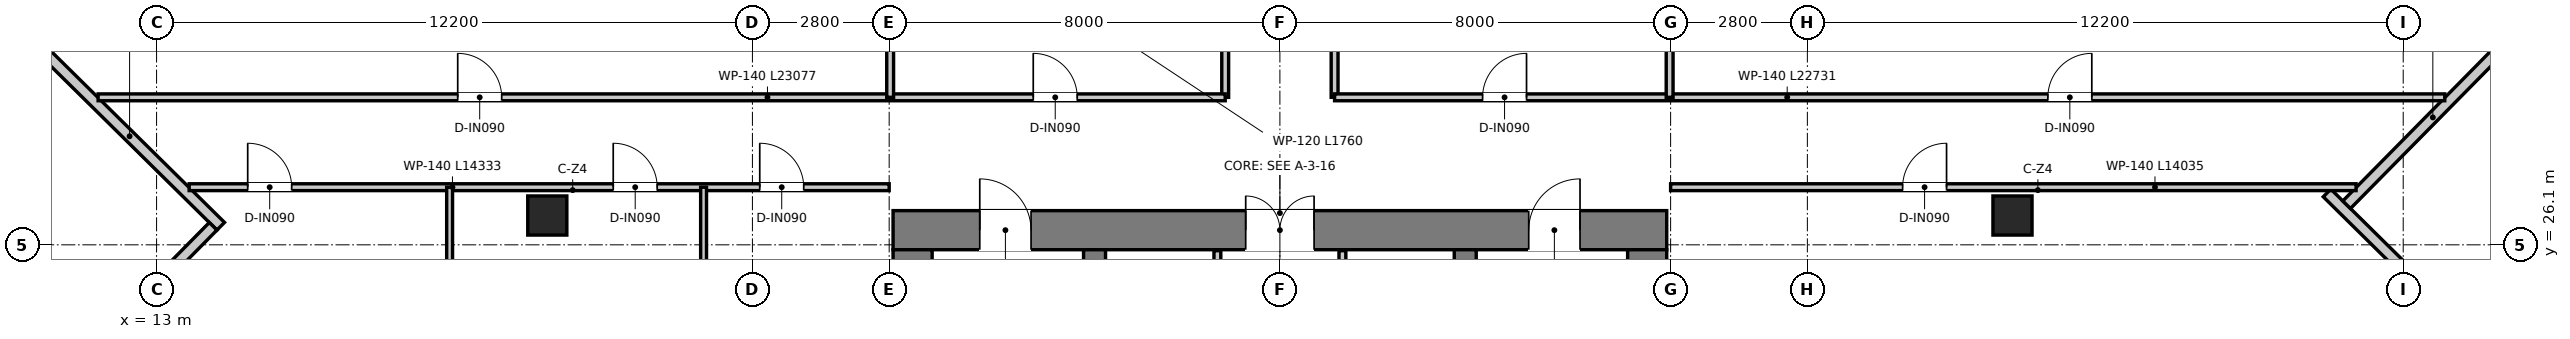
"""IFC4 building model, lengths in metres.
Left out: names, types, materials, properties, quantities, classifications, styles, units other than length and angle.
Written with IfcOpenShell. Run it as: python <this file> out.ifc"""

import sys

from ifc_helpers import new_model, si_unit, direction, frame, frame_2d, origin, origin_2d, place, context, subcontext, project, spatial, rectangle, extrude, source, transform, mapped, element, fill, save


model = new_model("IFC4")
c1 = context("Model", 3, precision=1e-05, world=origin(), true_north=direction((0.0, 1.0)))
c2 = subcontext(c1, "Body", "Model", "MODEL_VIEW")
j1 = project(units=[si_unit("LENGTHUNIT", "METRE"), si_unit("PLANEANGLEUNIT", "RADIAN")], contexts=[c1])
p1 = place(None, origin())
s1 = spatial("IfcSite", under=j1, at=p1, CompositionType="ELEMENT")
p2 = place(p1, origin())
s2 = spatial("IfcBuilding", under=s1, at=p2, CompositionType="ELEMENT")
p3 = place(p2, frame((0.0, 0.0, 234.95)))
s3 = spatial("IfcBuildingStorey", under=s2, at=p3, CompositionType="ELEMENT", Elevation=234.95)
p4 = place(p3, frame((28.08, 26.4, 0.0), z_axis=(0.0, 0.0, 1.0), x_axis=(1.0, 0.0, 0.0)))
e1 = element("IfcWall", 1, at=p4, inside=s3, PredefinedType="SHEAR", context=c2, shape_type="SweptSolid", body=[
    extrude(rectangle(XDim=15.84, YDim=0.8, at=frame_2d((7.92, 0.0))), origin(), (0.0, 0.0, 1.0), 3.95),
])
p5 = place(p4, frame((7.22, 0.0, 0.0)))
e2 = element("IfcOpeningElement", 2, at=p5, cuts=e1, PredefinedType="OPENING", context=c2, shape_type="SweptSolid", body=[
    extrude(rectangle(XDim=1.4, YDim=2.2, at=frame_2d((0.7, 1.1))), frame((0.0, 0.41, 0.0), z_axis=(0.0, -1.0, 0.0), x_axis=(1.0, 0.0, 0.0)), (0.0, 0.0, 1.0), 0.82),
])
p6 = place(p4, frame((1.775, 0.0, 0.0)))
e3 = element("IfcOpeningElement", 3, at=p6, cuts=e1, PredefinedType="OPENING", context=c2, shape_type="SweptSolid", body=[
    extrude(rectangle(XDim=1.05, YDim=2.1, at=frame_2d((0.525, 1.05))), frame((0.0, 0.41, 0.0), z_axis=(0.0, -1.0, 0.0), x_axis=(1.0, 0.0, 0.0)), (0.0, 0.0, 1.0), 0.82),
])
p7 = place(p4, frame((13.015, 0.0, 0.0)))
e4 = element("IfcOpeningElement", 4, at=p7, cuts=e1, PredefinedType="OPENING", context=c2, shape_type="SweptSolid", body=[
    extrude(rectangle(XDim=1.05, YDim=2.1, at=frame_2d((0.525, 1.05))), frame((0.0, 0.41, 0.0), z_axis=(0.0, -1.0, 0.0), x_axis=(1.0, 0.0, 0.0)), (0.0, 0.0, 1.0), 0.82),
])
for number, where, z_axis, x_axis in (
    (5, (28.48, 11.3, 0.0), (0.0, 0.0, 1.0), (0.0, 1.0, 0.0)),
    (6, (43.52, 11.3, 0.0), (0.0, 0.0, 1.0), (0.0, 1.0, 0.0)),
):
    element("IfcWall", number, at=place(p3, frame(where, z_axis=z_axis, x_axis=x_axis)), inside=s3, PredefinedType="SHEAR", context=c2, shape_type="SweptSolid", body=[
        extrude(rectangle(XDim=14.7, YDim=0.8, at=frame_2d((7.35, 0.0))), origin(), (0.0, 0.0, 1.0), 3.95),
    ])
p8 = place(p3, frame((32.205, 13.22, 0.0), z_axis=(0.0, 0.0, 1.0), x_axis=(0.0, 1.0, 0.0)))
e7 = element("IfcWall", 7, at=p8, inside=s3, PredefinedType="SHEAR", context=c2, shape_type="SweptSolid", body=[
    extrude(rectangle(XDim=12.78, YDim=0.45, at=frame_2d((6.39, 0.0))), origin(), (0.0, 0.0, 1.0), 3.95),
])
p9 = place(p8, frame((10.58, 0.0, 0.0)))
e8 = element("IfcOpeningElement", 8, at=p9, cuts=e7, PredefinedType="OPENING", context=c2, shape_type="SweptSolid", body=[
    extrude(rectangle(XDim=1.1, YDim=2.15, at=frame_2d((0.55, 1.075))), frame((0.0, 0.235, 0.0), z_axis=(0.0, -1.0, 0.0), x_axis=(1.0, 0.0, 0.0)), (0.0, 0.0, 1.0), 0.47),
])
p10 = place(p3, frame((39.795, 13.22, 0.0), z_axis=(0.0, 0.0, 1.0), x_axis=(0.0, 1.0, 0.0)))
e9 = element("IfcWall", 9, at=p10, inside=s3, PredefinedType="SHEAR", context=c2, shape_type="SweptSolid", body=[
    extrude(rectangle(XDim=12.78, YDim=0.45, at=frame_2d((6.39, 0.0))), origin(), (0.0, 0.0, 1.0), 3.95),
])
p11 = place(p10, frame((10.58, 0.0, 0.0)))
e10 = element("IfcOpeningElement", 10, at=p11, cuts=e9, PredefinedType="OPENING", context=c2, shape_type="SweptSolid", body=[
    extrude(rectangle(XDim=1.1, YDim=2.15, at=frame_2d((0.55, 1.075))), frame((0.0, 0.235, 0.0), z_axis=(0.0, -1.0, 0.0), x_axis=(1.0, 0.0, 0.0)), (0.0, 0.0, 1.0), 0.47),
])
m1 = source(origin(), c2, "Body", "SweptSolid", [
    extrude(rectangle(XDim=0.8, YDim=0.8, at=origin_2d()), origin(), (0.0, 0.0, 1.0), 3.95),
])
for number, where, z_axis, x_axis in (
    (11, (21.0, 26.7, 0.0), (0.0, 0.0, 1.0), (1.0, 0.0, 0.0)),
    (12, (51.0, 26.7, 0.0), (0.0, 0.0, 1.0), (1.0, 0.0, 0.0)),
):
    element("IfcColumn", number, at=place(p3, frame(where, z_axis=z_axis, x_axis=x_axis)), inside=s3, PredefinedType="COLUMN", context=c2, shape_type="MappedRepresentation", body=[
        mapped(m1, transform((0.0, 0.0, 0.0), x_axis=(1.0, 0.0, 0.0), y_axis=(0.0, 1.0, 0.0), z_axis=(0.0, 0.0, 1.0), scale=1.0)),
    ])
p12 = place(p3, frame((10.581, 30.165, 0.0), z_axis=(0.0, 0.0, 1.0), x_axis=(0.711699894533, -0.702483636906, 0.0)))
e13 = element("IfcWall", 13, at=p12, inside=s3, PredefinedType="ELEMENTEDWALL", context=c2, shape_type="SweptSolid", body=[
    extrude(rectangle(XDim=5.245, YDim=0.22, at=frame_2d((2.623, 0.0))), origin(), (0.0, 0.0, 1.0), 3.67),
])
p13 = place(p3, frame((14.158, 26.479, 0.0), z_axis=(0.0, 0.0, 1.0), x_axis=(-0.702451626199, -0.711731489292, 0.0)))
e14 = element("IfcWall", 14, at=p13, inside=s3, PredefinedType="ELEMENTEDWALL", context=c2, shape_type="SweptSolid", body=[
    extrude(rectangle(XDim=5.025, YDim=0.22, at=frame_2d((2.512, 0.0))), origin(), (0.0, 0.0, 1.0), 3.67),
])
p14 = place(p3, frame((61.419, 23.235, 0.0), z_axis=(0.0, 0.0, 1.0), x_axis=(-0.711721132709, 0.702462119446, 0.0)))
e15 = element("IfcWall", 15, at=p14, inside=s3, PredefinedType="ELEMENTEDWALL", context=c2, shape_type="SweptSolid", body=[
    extrude(rectangle(XDim=5.59, YDim=0.22, at=frame_2d((2.795, 0.0))), origin(), (0.0, 0.0, 1.0), 3.67),
])
p15 = place(p3, frame((57.842, 26.921, 0.0), z_axis=(0.0, 0.0, 1.0), x_axis=(0.702451626199, 0.711731489292, 0.0)))
e16 = element("IfcWall", 16, at=p15, inside=s3, PredefinedType="ELEMENTEDWALL", context=c2, shape_type="SweptSolid", body=[
    extrude(rectangle(XDim=5.025, YDim=0.22, at=frame_2d((2.512, 0.0))), origin(), (0.0, 0.0, 1.0), 3.67),
])
p16 = place(p3, frame((34.72, 20.2, 0.0), z_axis=(0.0, 0.0, 1.0), x_axis=(0.0, 1.0, 0.0)))
e17 = element("IfcWall", 17, at=p16, inside=s3, PredefinedType="PARTITIONING", context=c2, shape_type="SweptSolid", body=[
    extrude(rectangle(XDim=5.78, YDim=0.14, at=frame_2d((2.89, 0.0))), origin(), (0.0, 0.0, 1.0), 2.67),
])
p17 = place(p16, frame((1.05, 0.0, 0.0)))
e18 = element("IfcOpeningElement", 18, at=p17, cuts=e17, PredefinedType="OPENING", context=c2, shape_type="SweptSolid", body=[
    extrude(rectangle(XDim=0.9, YDim=2.1, at=frame_2d((0.45, 1.05))), frame((0.0, 0.08, 0.0), z_axis=(0.0, -1.0, 0.0), x_axis=(1.0, 0.0, 0.0)), (0.0, 0.0, 1.0), 0.16),
])
p18 = place(p3, frame((37.28, 20.2, 0.0), z_axis=(0.0, 0.0, 1.0), x_axis=(0.0, 1.0, 0.0)))
e19 = element("IfcWall", 19, at=p18, inside=s3, PredefinedType="PARTITIONING", context=c2, shape_type="SweptSolid", body=[
    extrude(rectangle(XDim=5.78, YDim=0.14, at=frame_2d((2.89, 0.0))), origin(), (0.0, 0.0, 1.0), 2.67),
])
p19 = place(p18, frame((0.95, 0.0, 0.0)))
e20 = element("IfcOpeningElement", 20, at=p19, cuts=e19, PredefinedType="OPENING", context=c2, shape_type="SweptSolid", body=[
    extrude(rectangle(XDim=1.1, YDim=2.15, at=frame_2d((0.55, 1.075))), frame((0.0, 0.08, 0.0), z_axis=(0.0, -1.0, 0.0), x_axis=(1.0, 0.0, 0.0)), (0.0, 0.0, 1.0), 0.16),
])
p20 = place(p3, frame((34.88, 29.12, 0.0), z_axis=(0.0, 0.0, 1.0), x_axis=(0.0, 1.0, 0.0)))
e21 = element("IfcWall", 21, at=p20, inside=s3, PredefinedType="PARTITIONING", context=c2, shape_type="SweptSolid", body=[
    extrude(rectangle(XDim=11.76, YDim=0.14, at=frame_2d((5.88, 0.0))), origin(), (0.0, 0.0, 1.0), 3.03),
])
p21 = place(p20, frame((4.085, 0.0, 0.0)))
e22 = element("IfcOpeningElement", 22, at=p21, cuts=e21, PredefinedType="OPENING", context=c2, shape_type="SweptSolid", body=[
    extrude(rectangle(XDim=0.95, YDim=2.1, at=frame_2d((0.475, 1.05))), frame((0.0, 0.08, 0.0), z_axis=(0.0, -1.0, 0.0), x_axis=(1.0, 0.0, 0.0)), (0.0, 0.0, 1.0), 0.16),
])
p22 = place(p20, frame((6.82, 0.0, 0.0)))
e23 = element("IfcOpeningElement", 23, at=p22, cuts=e21, PredefinedType="OPENING", context=c2, shape_type="SweptSolid", body=[
    extrude(rectangle(XDim=0.9, YDim=2.1, at=frame_2d((0.45, 1.05))), frame((0.0, 0.08, 0.0), z_axis=(0.0, -1.0, 0.0), x_axis=(1.0, 0.0, 0.0)), (0.0, 0.0, 1.0), 0.16),
])
p23 = place(p20, frame((9.83, 0.0, 0.0)))
e24 = element("IfcOpeningElement", 24, at=p23, cuts=e21, PredefinedType="OPENING", context=c2, shape_type="SweptSolid", body=[
    extrude(rectangle(XDim=0.9, YDim=2.1, at=frame_2d((0.45, 1.05))), frame((0.0, 0.08, 0.0), z_axis=(0.0, -1.0, 0.0), x_axis=(1.0, 0.0, 0.0)), (0.0, 0.0, 1.0), 0.16),
])
p24 = place(p3, frame((37.12, 29.12, 0.0), z_axis=(0.0, 0.0, 1.0), x_axis=(0.0, 1.0, 0.0)))
e25 = element("IfcWall", 25, at=p24, inside=s3, PredefinedType="PARTITIONING", context=c2, shape_type="SweptSolid", body=[
    extrude(rectangle(XDim=11.76, YDim=0.14, at=frame_2d((5.88, 0.0))), origin(), (0.0, 0.0, 1.0), 3.03),
])
p25 = place(p24, frame((3.205, 0.0, 0.0)))
e26 = element("IfcOpeningElement", 26, at=p25, cuts=e25, PredefinedType="OPENING", context=c2, shape_type="SweptSolid", body=[
    extrude(rectangle(XDim=0.95, YDim=2.1, at=frame_2d((0.475, 1.05))), frame((0.0, 0.08, 0.0), z_axis=(0.0, -1.0, 0.0), x_axis=(1.0, 0.0, 0.0)), (0.0, 0.0, 1.0), 0.16),
])
p26 = place(p24, frame((8.02, 0.0, 0.0)))
e27 = element("IfcOpeningElement", 27, at=p26, cuts=e25, PredefinedType="OPENING", context=c2, shape_type="SweptSolid", body=[
    extrude(rectangle(XDim=0.9, YDim=2.1, at=frame_2d((0.45, 1.05))), frame((0.0, 0.08, 0.0), z_axis=(0.0, -1.0, 0.0), x_axis=(1.0, 0.0, 0.0)), (0.0, 0.0, 1.0), 0.16),
])
p27 = place(p3, frame((11.803, 29.12, 0.0), z_axis=(0.0, 0.0, 1.0), x_axis=(1.0, 0.0, 0.0)))
e28 = element("IfcWall", 28, at=p27, inside=s3, PredefinedType="PARTITIONING", context=c2, shape_type="SweptSolid", body=[
    extrude(rectangle(XDim=23.077, YDim=0.14, at=frame_2d((11.538, 0.0))), origin(), (0.0, 0.0, 1.0), 3.03),
])
p28 = place(p27, frame((19.147, 0.0, 0.0)))
e29 = element("IfcOpeningElement", 29, at=p28, cuts=e28, PredefinedType="OPENING", context=c2, shape_type="SweptSolid", body=[
    extrude(rectangle(XDim=0.9, YDim=2.1, at=frame_2d((0.45, 1.05))), frame((0.0, 0.08, 0.0), z_axis=(0.0, -1.0, 0.0), x_axis=(1.0, 0.0, 0.0)), (0.0, 0.0, 1.0), 0.16),
])
p29 = place(p27, frame((7.363, 0.0, 0.0)))
e30 = element("IfcOpeningElement", 30, at=p29, cuts=e28, PredefinedType="OPENING", context=c2, shape_type="SweptSolid", body=[
    extrude(rectangle(XDim=0.9, YDim=2.1, at=frame_2d((0.45, 1.05))), frame((0.0, 0.08, 0.0), z_axis=(0.0, -1.0, 0.0), x_axis=(1.0, 0.0, 0.0)), (0.0, 0.0, 1.0), 0.16),
])
p30 = place(p3, frame((37.12, 29.12, 0.0), z_axis=(0.0, 0.0, 1.0), x_axis=(1.0, 0.0, 0.0)))
e31 = element("IfcWall", 31, at=p30, inside=s3, PredefinedType="PARTITIONING", context=c2, shape_type="SweptSolid", body=[
    extrude(rectangle(XDim=22.73, YDim=0.14, at=frame_2d((11.365, 0.0))), origin(), (0.0, 0.0, 1.0), 3.03),
])
p31 = place(p30, frame((3.03, 0.0, 0.0)))
e32 = element("IfcOpeningElement", 32, at=p31, cuts=e31, PredefinedType="OPENING", context=c2, shape_type="SweptSolid", body=[
    extrude(rectangle(XDim=0.9, YDim=2.1, at=frame_2d((0.45, 1.05))), frame((0.0, 0.08, 0.0), z_axis=(0.0, -1.0, 0.0), x_axis=(1.0, 0.0, 0.0)), (0.0, 0.0, 1.0), 0.16),
])
p32 = place(p30, frame((14.604, 0.0, 0.0)))
e33 = element("IfcOpeningElement", 33, at=p32, cuts=e31, PredefinedType="OPENING", context=c2, shape_type="SweptSolid", body=[
    extrude(rectangle(XDim=0.9, YDim=2.1, at=frame_2d((0.45, 1.05))), frame((0.0, 0.08, 0.0), z_axis=(0.0, -1.0, 0.0), x_axis=(1.0, 0.0, 0.0)), (0.0, 0.0, 1.0), 0.16),
])
p33 = place(p3, frame((13.667, 27.28, 0.0), z_axis=(0.0, 0.0, 1.0), x_axis=(1.0, 0.0, 0.0)))
e34 = element("IfcWall", 34, at=p33, inside=s3, PredefinedType="PARTITIONING", context=c2, shape_type="SweptSolid", body=[
    extrude(rectangle(XDim=14.333, YDim=0.14, at=frame_2d((7.166, 0.0))), origin(), (0.0, 0.0, 1.0), 3.03),
])
p34 = place(p33, frame((1.198, 0.0, 0.0)))
e35 = element("IfcOpeningElement", 35, at=p34, cuts=e34, PredefinedType="OPENING", context=c2, shape_type="SweptSolid", body=[
    extrude(rectangle(XDim=0.9, YDim=2.1, at=frame_2d((0.45, 1.05))), frame((0.0, 0.08, 0.0), z_axis=(0.0, -1.0, 0.0), x_axis=(1.0, 0.0, 0.0)), (0.0, 0.0, 1.0), 0.16),
])
p35 = place(p33, frame((8.683, 0.0, 0.0)))
e36 = element("IfcOpeningElement", 36, at=p35, cuts=e34, PredefinedType="OPENING", context=c2, shape_type="SweptSolid", body=[
    extrude(rectangle(XDim=0.9, YDim=2.1, at=frame_2d((0.45, 1.05))), frame((0.0, 0.08, 0.0), z_axis=(0.0, -1.0, 0.0), x_axis=(1.0, 0.0, 0.0)), (0.0, 0.0, 1.0), 0.16),
])
p36 = place(p33, frame((11.683, 0.0, 0.0)))
e37 = element("IfcOpeningElement", 37, at=p36, cuts=e34, PredefinedType="OPENING", context=c2, shape_type="SweptSolid", body=[
    extrude(rectangle(XDim=0.9, YDim=2.1, at=frame_2d((0.45, 1.05))), frame((0.0, 0.08, 0.0), z_axis=(0.0, -1.0, 0.0), x_axis=(1.0, 0.0, 0.0)), (0.0, 0.0, 1.0), 0.16),
])
p37 = place(p3, frame((44.0, 27.28, 0.0), z_axis=(0.0, 0.0, 1.0), x_axis=(1.0, 0.0, 0.0)))
e38 = element("IfcWall", 38, at=p37, inside=s3, PredefinedType="PARTITIONING", context=c2, shape_type="SweptSolid", body=[
    extrude(rectangle(XDim=14.035, YDim=0.14, at=frame_2d((7.017, 0.0))), origin(), (0.0, 0.0, 1.0), 3.03),
])
p38 = place(p37, frame((4.75, 0.0, 0.0)))
e39 = element("IfcOpeningElement", 39, at=p38, cuts=e38, PredefinedType="OPENING", context=c2, shape_type="SweptSolid", body=[
    extrude(rectangle(XDim=0.9, YDim=2.1, at=frame_2d((0.45, 1.05))), frame((0.0, 0.08, 0.0), z_axis=(0.0, -1.0, 0.0), x_axis=(1.0, 0.0, 0.0)), (0.0, 0.0, 1.0), 0.16),
])
for number, where, z_axis, x_axis in (
    (40, (28.02, 29.12, 0.0), (0.0, 0.0, 1.0), (0.0, 1.0, 0.0)),
    (41, (43.98, 29.12, 0.0), (0.0, 0.0, 1.0), (0.0, 1.0, 0.0)),
):
    element("IfcWall", number, at=place(p3, frame(where, z_axis=z_axis, x_axis=x_axis)), inside=s3, PredefinedType="PARTITIONING", context=c2, shape_type="SweptSolid", body=[
        extrude(rectangle(XDim=5.46, YDim=0.14, at=frame_2d((2.73, 0.0))), origin(), (0.0, 0.0, 1.0), 3.37),
    ])
p39 = place(p3, frame((19.0, 14.802, 0.0), z_axis=(0.0, 0.0, 1.0), x_axis=(0.0, 1.0, 0.0)))
e42 = element("IfcWall", 42, at=p39, inside=s3, PredefinedType="PARTITIONING", context=c2, shape_type="SweptSolid", body=[
    extrude(rectangle(XDim=12.478, YDim=0.12, at=frame_2d((6.239, 0.0))), origin(), (0.0, 0.0, 1.0), 3.67),
])
p40 = place(p3, frame((24.2, 9.669, 0.0), z_axis=(0.0, 0.0, 1.0), x_axis=(0.0, 1.0, 0.0)))
e43 = element("IfcWall", 43, at=p40, inside=s3, PredefinedType="PARTITIONING", context=c2, shape_type="SweptSolid", body=[
    extrude(rectangle(XDim=17.611, YDim=0.12, at=frame_2d((8.805, 0.0))), origin(), (0.0, 0.0, 1.0), 3.18),
])
p41 = place(p5, origin())
e44 = element("IfcDoor", 44, at=p41, inside=s3, OperationType="DOUBLE_DOOR_SINGLE_SWING", PredefinedType="DOOR", context=c2, shape_type="SweptSolid", body=[
    extrude(rectangle(XDim=1.4, YDim=2.2, at=frame_2d((0.7, 1.1))), frame((0.0, 0.025, 0.0), z_axis=(0.0, -1.0, 0.0), x_axis=(1.0, 0.0, 0.0)), (0.0, 0.0, 1.0), 0.05),
])
fill(e2, e44)
p42 = place(p6, origin())
e45 = element("IfcDoor", 45, at=p42, inside=s3, OperationType="SINGLE_SWING_LEFT", PredefinedType="DOOR", context=c2, shape_type="SweptSolid", body=[
    extrude(rectangle(XDim=1.05, YDim=2.1, at=frame_2d((0.525, 1.05))), frame((0.0, 0.025, 0.0), z_axis=(0.0, -1.0, 0.0), x_axis=(1.0, 0.0, 0.0)), (0.0, 0.0, 1.0), 0.05),
])
fill(e3, e45)
p43 = place(p7, origin())
e46 = element("IfcDoor", 46, at=p43, inside=s3, OperationType="SINGLE_SWING_RIGHT", PredefinedType="DOOR", context=c2, shape_type="SweptSolid", body=[
    extrude(rectangle(XDim=1.05, YDim=2.1, at=frame_2d((0.525, 1.05))), frame((0.0, 0.025, 0.0), z_axis=(0.0, -1.0, 0.0), x_axis=(1.0, 0.0, 0.0)), (0.0, 0.0, 1.0), 0.05),
])
fill(e4, e46)
p44 = place(p28, origin())
e47 = element("IfcDoor", 47, at=p44, inside=s3, OperationType="SINGLE_SWING_LEFT", PredefinedType="DOOR", context=c2, shape_type="SweptSolid", body=[
    extrude(rectangle(XDim=0.9, YDim=2.1, at=frame_2d((0.45, 1.05))), frame((0.0, 0.025, 0.0), z_axis=(0.0, -1.0, 0.0), x_axis=(1.0, 0.0, 0.0)), (0.0, 0.0, 1.0), 0.05),
])
fill(e29, e47)
p45 = place(p31, origin())
e48 = element("IfcDoor", 48, at=p45, inside=s3, OperationType="SINGLE_SWING_RIGHT", PredefinedType="DOOR", context=c2, shape_type="SweptSolid", body=[
    extrude(rectangle(XDim=0.9, YDim=2.1, at=frame_2d((0.45, 1.05))), frame((0.0, 0.025, 0.0), z_axis=(0.0, -1.0, 0.0), x_axis=(1.0, 0.0, 0.0)), (0.0, 0.0, 1.0), 0.05),
])
fill(e32, e48)
p46 = place(p29, origin())
e49 = element("IfcDoor", 49, at=p46, inside=s3, OperationType="SINGLE_SWING_LEFT", PredefinedType="DOOR", context=c2, shape_type="SweptSolid", body=[
    extrude(rectangle(XDim=0.9, YDim=2.1, at=frame_2d((0.45, 1.05))), frame((0.0, 0.025, 0.0), z_axis=(0.0, -1.0, 0.0), x_axis=(1.0, 0.0, 0.0)), (0.0, 0.0, 1.0), 0.05),
])
fill(e30, e49)
p47 = place(p32, origin())
e50 = element("IfcDoor", 50, at=p47, inside=s3, OperationType="SINGLE_SWING_RIGHT", PredefinedType="DOOR", context=c2, shape_type="SweptSolid", body=[
    extrude(rectangle(XDim=0.9, YDim=2.1, at=frame_2d((0.45, 1.05))), frame((0.0, 0.025, 0.0), z_axis=(0.0, -1.0, 0.0), x_axis=(1.0, 0.0, 0.0)), (0.0, 0.0, 1.0), 0.05),
])
fill(e33, e50)
p48 = place(p34, origin())
e51 = element("IfcDoor", 51, at=p48, inside=s3, OperationType="SINGLE_SWING_LEFT", PredefinedType="DOOR", context=c2, shape_type="SweptSolid", body=[
    extrude(rectangle(XDim=0.9, YDim=2.1, at=frame_2d((0.45, 1.05))), frame((0.0, 0.025, 0.0), z_axis=(0.0, -1.0, 0.0), x_axis=(1.0, 0.0, 0.0)), (0.0, 0.0, 1.0), 0.05),
])
fill(e35, e51)
p49 = place(p35, origin())
e52 = element("IfcDoor", 52, at=p49, inside=s3, OperationType="SINGLE_SWING_LEFT", PredefinedType="DOOR", context=c2, shape_type="SweptSolid", body=[
    extrude(rectangle(XDim=0.9, YDim=2.1, at=frame_2d((0.45, 1.05))), frame((0.0, 0.025, 0.0), z_axis=(0.0, -1.0, 0.0), x_axis=(1.0, 0.0, 0.0)), (0.0, 0.0, 1.0), 0.05),
])
fill(e36, e52)
p50 = place(p36, origin())
e53 = element("IfcDoor", 53, at=p50, inside=s3, OperationType="SINGLE_SWING_LEFT", PredefinedType="DOOR", context=c2, shape_type="SweptSolid", body=[
    extrude(rectangle(XDim=0.9, YDim=2.1, at=frame_2d((0.45, 1.05))), frame((0.0, 0.025, 0.0), z_axis=(0.0, -1.0, 0.0), x_axis=(1.0, 0.0, 0.0)), (0.0, 0.0, 1.0), 0.05),
])
fill(e37, e53)
p51 = place(p38, origin())
e54 = element("IfcDoor", 54, at=p51, inside=s3, OperationType="SINGLE_SWING_RIGHT", PredefinedType="DOOR", context=c2, shape_type="SweptSolid", body=[
    extrude(rectangle(XDim=0.9, YDim=2.1, at=frame_2d((0.45, 1.05))), frame((0.0, 0.025, 0.0), z_axis=(0.0, -1.0, 0.0), x_axis=(1.0, 0.0, 0.0)), (0.0, 0.0, 1.0), 0.05),
])
fill(e39, e54)
save(model, sys.argv[1])
